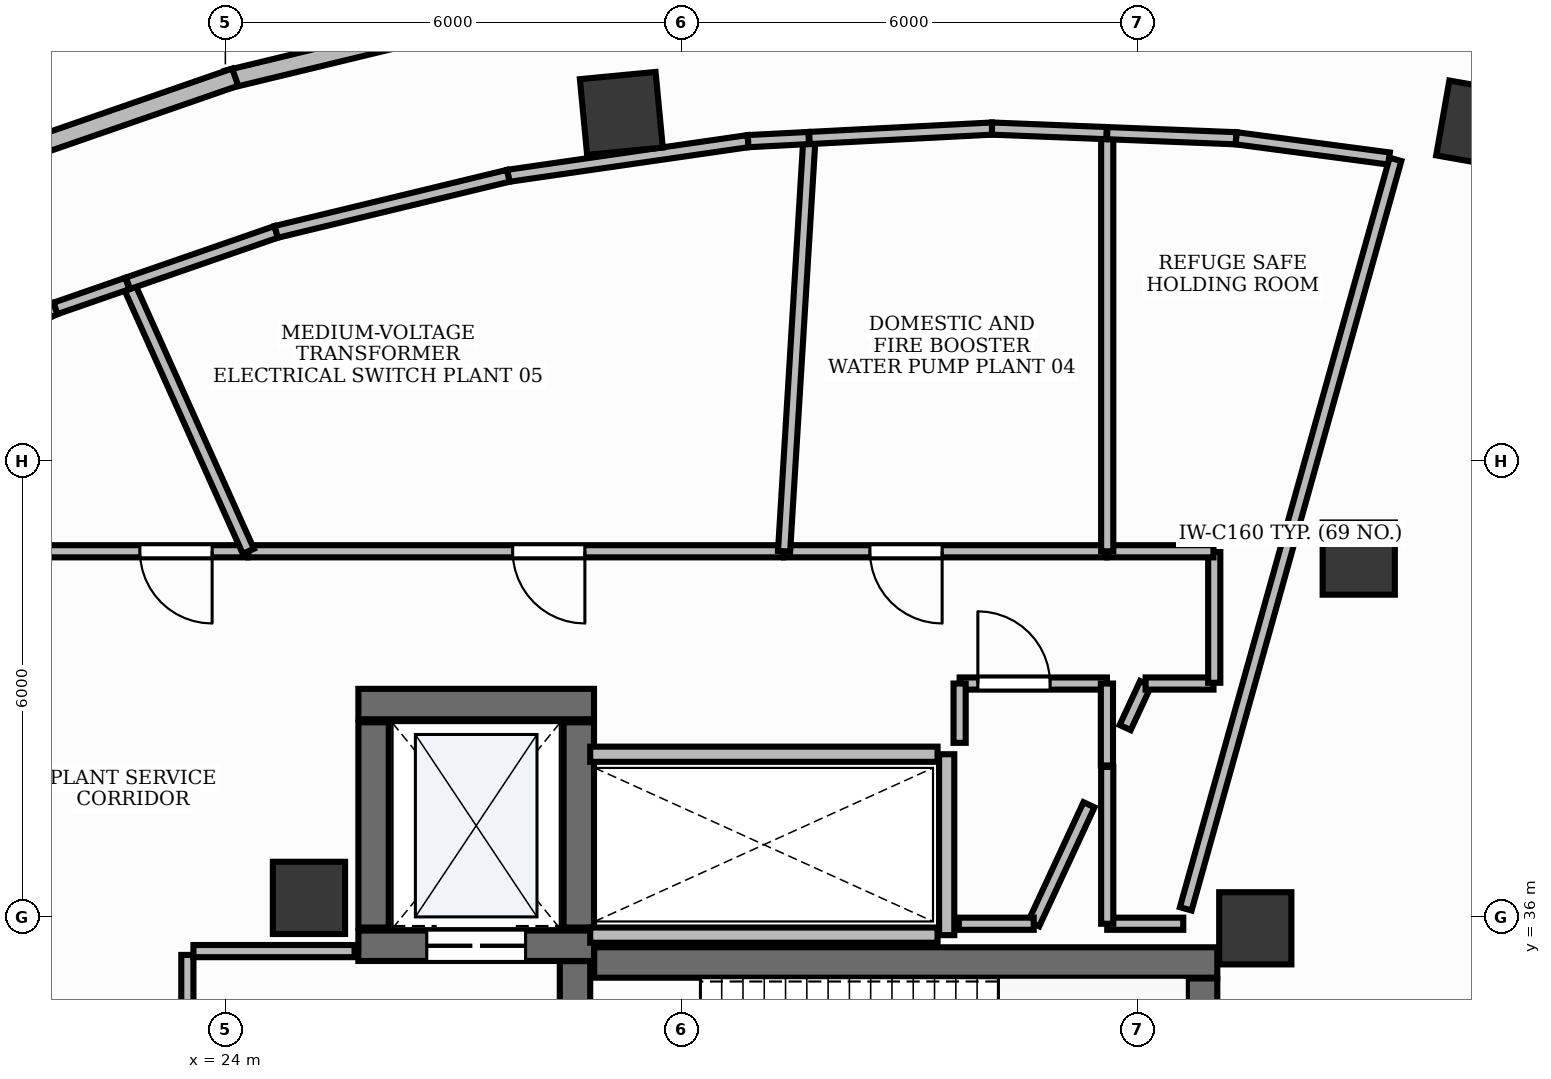
"""IFC4 building model, lengths in metres.
Left out: names, types, materials, properties, quantities, classifications, styles, units other than length and angle.
Written with IfcOpenShell. Run it as: python <this file> out.ifc"""

import sys

from ifc_helpers import new_model, si_unit, direction, frame, frame_2d, origin, origin_2d, place, context, subcontext, project, spatial, rectangle, extrude, element, fill, save


model = new_model("IFC4")
c1 = context("Model", 3, precision=1e-05, world=origin(), true_north=direction((0.0, 1.0)))
c2 = subcontext(c1, "Body", "Model", "MODEL_VIEW")
j1 = project(units=[si_unit("LENGTHUNIT", "METRE"), si_unit("PLANEANGLEUNIT", "RADIAN")], contexts=[c1])
p1 = place(None, origin())
s1 = spatial("IfcSite", under=j1, at=p1, CompositionType="ELEMENT")
p2 = place(p1, origin())
s2 = spatial("IfcBuilding", under=s1, at=p2, CompositionType="ELEMENT")
p3 = place(p2, frame((0.0, 0.0, 213.0)))
s3 = spatial("IfcBuildingStorey", under=s2, at=p3, CompositionType="ELEMENT", Elevation=213.0)
p4 = place(p3, frame((28.852, 35.4, 0.0), z_axis=(0.0, 0.0, 1.0), x_axis=(1.0, 0.0, 0.0)))
e1 = element("IfcWall", 1, at=p4, inside=s3, PredefinedType="SHEAR", context=c2, shape_type="SweptSolid", body=[
    extrude(rectangle(XDim=8.198, YDim=0.4, at=frame_2d((4.099, 0.0))), origin(), (0.0, 0.0, 1.0), 5.1),
])
p5 = place(p3, frame((36.85, 32.11, 0.0), z_axis=(0.0, 0.0, 1.0), x_axis=(0.0, 1.0, 0.0)))
e2 = element("IfcWall", 2, at=p5, inside=s3, PredefinedType="SHEAR", context=c2, shape_type="SweptSolid", body=[
    extrude(rectangle(XDim=3.08, YDim=0.4, at=frame_2d((1.54, 0.0))), origin(), (0.0, 0.0, 1.0), 5.1),
])
p6 = place(p3, frame((28.6, 32.11, 0.0), z_axis=(0.0, 0.0, 1.0), x_axis=(0.0, 1.0, 0.0)))
e3 = element("IfcWall", 3, at=p6, inside=s3, PredefinedType="SHEAR", context=c2, shape_type="SweptSolid", body=[
    extrude(rectangle(XDim=3.308, YDim=0.4, at=frame_2d((1.654, 0.0))), origin(), (0.0, 0.0, 1.0), 5.1),
])
p7 = place(p6, frame((0.2, 0.0, 0.0)))
e4 = element("IfcOpeningElement", 4, at=p7, cuts=e3, PredefinedType="OPENING", context=c2, shape_type="SweptSolid", body=[
    extrude(rectangle(XDim=1.05, YDim=2.15, at=frame_2d((0.525, 1.075))), frame((0.0, 0.215, 0.0), z_axis=(0.0, -1.0, 0.0), x_axis=(1.0, 0.0, 0.0)), (0.0, 0.0, 1.0), 0.43),
])
p8 = place(p3, frame((25.75, 38.8, 0.0), z_axis=(0.0, 0.0, 1.0), x_axis=(1.0, 0.0, 0.0)))
e5 = element("IfcWall", 5, at=p8, inside=s3, PredefinedType="SHEAR", context=c2, shape_type="SweptSolid", body=[
    extrude(rectangle(XDim=3.1, YDim=0.4, at=frame_2d((1.55, 0.0))), origin(), (0.0, 0.0, 1.0), 5.1),
])
p9 = place(p3, frame((25.75, 35.62, 0.0), z_axis=(0.0, 0.0, 1.0), x_axis=(1.0, 0.0, 0.0)))
e6 = element("IfcWall", 6, at=p9, inside=s3, PredefinedType="SHEAR", context=c2, shape_type="SweptSolid", body=[
    extrude(rectangle(XDim=3.1, YDim=0.4, at=frame_2d((1.55, 0.0))), origin(), (0.0, 0.0, 1.0), 5.1),
])
p10 = place(p9, frame((0.9, 0.0, 0.0)))
e7 = element("IfcOpeningElement", 7, at=p10, cuts=e6, PredefinedType="OPENING", context=c2, shape_type="SweptSolid", body=[
    extrude(rectangle(XDim=1.3, YDim=2.2, at=frame_2d((0.65, 1.1))), frame((0.0, 0.215, 0.0), z_axis=(0.0, -1.0, 0.0), x_axis=(1.0, 0.0, 0.0)), (0.0, 0.0, 1.0), 0.43),
])
for number, where, z_axis, x_axis in (
    (8, (25.95, 35.86, 0.0), (0.0, 0.0, 1.0), (0.0, 1.0, 0.0)),
    (9, (28.65, 35.86, 0.0), (0.0, 0.0, 1.0), (0.0, 1.0, 0.0)),
):
    element("IfcWall", number, at=place(p3, frame(where, z_axis=z_axis, x_axis=x_axis)), inside=s3, PredefinedType="SHEAR", context=c2, shape_type="SweptSolid", body=[
        extrude(rectangle(XDim=2.7, YDim=0.4, at=frame_2d((1.35, 0.0))), origin(), (0.0, 0.0, 1.0), 5.1),
    ])
for number, where, z_axis, x_axis in (
    (10, (37.55, 35.85, -0.0), (0.0, 0.0, 1.0), (1.0, 0.0, 0.0)),
    (11, (25.1, 36.25, -0.0), (0.0, 0.0, 1.0), (1.0, 0.0, 0.0)),
):
    element("IfcColumn", number, at=place(p3, frame(where, z_axis=z_axis, x_axis=x_axis)), inside=s3, PredefinedType="PILASTER", context=c2, shape_type="SweptSolid", body=[
        extrude(rectangle(XDim=0.95, YDim=0.95, at=origin_2d()), origin(), (0.0, 0.0, 1.0), 5.101),
    ])
p11 = place(p3, frame((40.509, 46.424, -0.0), z_axis=(0.0, 0.0, 1.0), x_axis=(-0.984868307662, 0.173304404339, 0.0)))
e12 = element("IfcColumn", 12, at=p11, inside=s3, PredefinedType="COLUMN", context=c2, shape_type="SweptSolid", body=[
    extrude(rectangle(XDim=1.0, YDim=1.0, at=origin_2d()), origin(), (0.0, 0.0, 1.0), 5.101),
])
p12 = place(p3, frame((38.911, 40.714, -0.0), z_axis=(0.0, 0.0, 1.0), x_axis=(1.0, 0.0, 0.0)))
e13 = element("IfcColumn", 13, at=p12, inside=s3, PredefinedType="COLUMN", context=c2, shape_type="SweptSolid", body=[
    extrude(rectangle(XDim=0.95, YDim=0.95, at=origin_2d()), origin(), (0.0, 0.0, 1.0), 5.101),
])
p13 = place(p3, frame((29.21, 46.571, -0.0), z_axis=(0.0, 0.0, 1.0), x_axis=(0.995462868748, 0.095150811579, 0.0)))
e14 = element("IfcColumn", 14, at=p13, inside=s3, PredefinedType="COLUMN", context=c2, shape_type="SweptSolid", body=[
    extrude(rectangle(XDim=1.0, YDim=1.0, at=origin_2d()), origin(), (0.0, 0.0, 1.0), 5.101),
])
p14 = place(p3, frame((27.378, 47.827, 0.0), z_axis=(0.0, 0.0, 1.0), x_axis=(-0.972029900204, -0.2348571334, 0.0)))
e15 = element("IfcWall", 15, at=p14, inside=s3, PredefinedType="STANDARD", context=c2, shape_type="SweptSolid", body=[
    extrude(rectangle(XDim=3.452, YDim=0.24, at=frame_2d((1.726, 0.0))), origin(), (0.0, 0.0, 1.0), 5.1),
])
p15 = place(p3, frame((24.129, 47.048, 0.0), z_axis=(0.0, 0.0, 1.0), x_axis=(-0.944829367367, -0.327562920004, 0.0)))
e16 = element("IfcWall", 16, at=p15, inside=s3, PredefinedType="STANDARD", context=c2, shape_type="SweptSolid", body=[
    extrude(rectangle(XDim=3.392, YDim=0.24, at=frame_2d((1.696, 0.0))), origin(), (0.0, 0.0, 1.0), 3.825),
])
p16 = place(p3, frame((33.49, 35.76, 0.0), z_axis=(0.0, 0.0, 1.0), x_axis=(0.0, 1.0, 0.0)))
e17 = element("IfcWall", 17, at=p16, inside=s3, PredefinedType="PARTITIONING", context=c2, shape_type="SweptSolid", body=[
    extrude(rectangle(XDim=2.38, YDim=0.2, at=frame_2d((1.19, 0.0))), origin(), (0.0, 0.0, 1.0), 3.41),
])
for number, where, z_axis, x_axis in (
    (18, (28.8, 35.76, 0.0), (0.0, 0.0, 1.0), (1.0, 0.0, 0.0)),
    (19, (28.8, 38.14, 0.0), (0.0, 0.0, 1.0), (1.0, 0.0, 0.0)),
):
    element("IfcWall", number, at=place(p3, frame(where, z_axis=z_axis, x_axis=x_axis)), inside=s3, PredefinedType="PARTITIONING", context=c2, shape_type="SweptSolid", body=[
        extrude(rectangle(XDim=4.57, YDim=0.2, at=frame_2d((2.285, 0.0))), origin(), (0.0, 0.0, 1.0), 3.41),
    ])
p17 = place(p3, frame((23.5, 32.1, 0.0), z_axis=(0.0, 0.0, 1.0), x_axis=(0.0, 1.0, 0.0)))
e20 = element("IfcWall", 20, at=p17, inside=s3, PredefinedType="PARTITIONING", context=c2, shape_type="SweptSolid", body=[
    extrude(rectangle(XDim=3.4, YDim=0.16, at=frame_2d((1.7, 0.0))), origin(), (0.0, 0.0, 1.0), 3.41),
])
p18 = place(p17, frame((1.175, 0.0, 0.0)))
e21 = element("IfcOpeningElement", 21, at=p18, cuts=e20, PredefinedType="OPENING", context=c2, shape_type="SweptSolid", body=[
    extrude(rectangle(XDim=1.05, YDim=2.15, at=frame_2d((0.525, 1.075))), frame((0.0, 0.095, 0.0), z_axis=(0.0, -1.0, 0.0), x_axis=(1.0, 0.0, 0.0)), (0.0, 0.0, 1.0), 0.19),
])
p19 = place(p3, frame((23.58, 35.55, 0.0), z_axis=(0.0, 0.0, 1.0), x_axis=(1.0, 0.0, 0.0)))
e22 = element("IfcWall", 22, at=p19, inside=s3, PredefinedType="PARTITIONING", context=c2, shape_type="SweptSolid", body=[
    extrude(rectangle(XDim=2.12, YDim=0.16, at=frame_2d((1.06, 0.0))), origin(), (0.0, 0.0, 1.0), 3.41),
])
p20 = place(p3, frame((33.66, 39.07, 0.0), z_axis=(0.0, 0.0, 1.0), x_axis=(1.0, 0.0, 0.0)))
e23 = element("IfcWall", 23, at=p20, inside=s3, PredefinedType="PARTITIONING", context=c2, shape_type="SweptSolid", body=[
    extrude(rectangle(XDim=1.938, YDim=0.16, at=frame_2d((0.969, 0.0))), origin(), (0.0, 0.0, 1.0), 3.41),
])
p21 = place(p20, frame((0.24, 0.0, 0.0)))
e24 = element("IfcOpeningElement", 24, at=p21, cuts=e23, PredefinedType="OPENING", context=c2, shape_type="SweptSolid", body=[
    extrude(rectangle(XDim=0.95, YDim=2.15, at=frame_2d((0.475, 1.075))), frame((0.0, 0.095, 0.0), z_axis=(0.0, -1.0, 0.0), x_axis=(1.0, 0.0, 0.0)), (0.0, 0.0, 1.0), 0.19),
])
p22 = place(p3, frame((35.592, 40.81, 0.0), z_axis=(0.0, 0.0, 1.0), x_axis=(-1.0, 0.0, 0.0)))
e25 = element("IfcWall", 25, at=p22, inside=s3, PredefinedType="PARTITIONING", context=c2, shape_type="SweptSolid", body=[
    extrude(rectangle(XDim=4.242, YDim=0.16, at=frame_2d((2.121, 0.0))), origin(), (0.0, 0.0, 1.0), 3.41),
])
p23 = place(p22, frame((2.162, 0.0, 0.0)))
e26 = element("IfcOpeningElement", 26, at=p23, cuts=e25, PredefinedType="OPENING", context=c2, shape_type="SweptSolid", body=[
    extrude(rectangle(XDim=0.95, YDim=2.15, at=frame_2d((0.475, 1.075))), frame((0.0, 0.095, 0.0), z_axis=(0.0, -1.0, 0.0), x_axis=(1.0, 0.0, 0.0)), (0.0, 0.0, 1.0), 0.19),
])
p24 = place(p3, frame((31.34, 40.81, 0.0), z_axis=(0.0, 0.0, 1.0), x_axis=(-1.0, 0.0, 0.0)))
e27 = element("IfcWall", 27, at=p24, inside=s3, PredefinedType="PARTITIONING", context=c2, shape_type="SweptSolid", body=[
    extrude(rectangle(XDim=7.038, YDim=0.16, at=frame_2d((3.519, 0.0))), origin(), (0.0, 0.0, 1.0), 3.41),
])
p25 = place(p24, frame((2.61, 0.0, 0.0)))
e28 = element("IfcOpeningElement", 28, at=p25, cuts=e27, PredefinedType="OPENING", context=c2, shape_type="SweptSolid", body=[
    extrude(rectangle(XDim=0.95, YDim=2.15, at=frame_2d((0.475, 1.075))), frame((0.0, 0.095, 0.0), z_axis=(0.0, -1.0, 0.0), x_axis=(1.0, 0.0, 0.0)), (0.0, 0.0, 1.0), 0.19),
])
p26 = place(p3, frame((24.292, 40.81, 0.0), z_axis=(0.0, 0.0, 1.0), x_axis=(-1.0, 0.0, 0.0)))
e29 = element("IfcWall", 29, at=p26, inside=s3, PredefinedType="PARTITIONING", context=c2, shape_type="SweptSolid", body=[
    extrude(rectangle(XDim=3.691, YDim=0.16, at=frame_2d((1.846, 0.0))), origin(), (0.0, 0.0, 1.0), 3.41),
])
p27 = place(p26, frame((0.466, 0.0, 0.0)))
e30 = element("IfcOpeningElement", 30, at=p27, cuts=e29, PredefinedType="OPENING", context=c2, shape_type="SweptSolid", body=[
    extrude(rectangle(XDim=0.95, YDim=2.15, at=frame_2d((0.475, 1.075))), frame((0.0, 0.095, 0.0), z_axis=(0.0, -1.0, 0.0), x_axis=(1.0, 0.0, 0.0)), (0.0, 0.0, 1.0), 0.19),
])
p28 = place(p3, frame((33.66, 38.29, 0.0), z_axis=(0.0, 0.0, 1.0), x_axis=(0.0, 1.0, 0.0)))
e31 = element("IfcWall", 31, at=p28, inside=s3, PredefinedType="PARTITIONING", context=c2, shape_type="SweptSolid", body=[
    extrude(rectangle(XDim=0.78, YDim=0.16, at=frame_2d((0.39, 0.0))), origin(), (0.0, 0.0, 1.0), 3.41),
])
p29 = place(p3, frame((35.598, 39.07, 0.0), z_axis=(0.0, 0.0, 1.0), x_axis=(0.0, -1.0, 0.0)))
e32 = element("IfcWall", 32, at=p29, inside=s3, PredefinedType="PARTITIONING", context=c2, shape_type="SweptSolid", body=[
    extrude(rectangle(XDim=1.078, YDim=0.16, at=frame_2d((0.539, 0.0))), origin(), (0.0, 0.0, 1.0), 3.41),
])
p30 = place(p3, frame((35.838, 38.491, 0.0), z_axis=(0.0, 0.0, 1.0), x_axis=(0.421335961971, 0.906904629578, 0.0)))
e33 = element("IfcWall", 33, at=p30, inside=s3, PredefinedType="PARTITIONING", context=c2, shape_type="SweptSolid", body=[
    extrude(rectangle(XDim=0.638, YDim=0.16, at=frame_2d((0.319, 0.0))), origin(), (0.0, 0.0, 1.0), 3.41),
])
p31 = place(p3, frame((36.107, 39.07, 0.0), z_axis=(0.0, 0.0, 1.0), x_axis=(1.0, 0.0, 0.0)))
e34 = element("IfcWall", 34, at=p31, inside=s3, PredefinedType="PARTITIONING", context=c2, shape_type="SweptSolid", body=[
    extrude(rectangle(XDim=0.893, YDim=0.16, at=frame_2d((0.447, 0.0))), origin(), (0.0, 0.0, 1.0), 3.41),
])
p32 = place(p3, frame((37.01, 39.08, 0.0), z_axis=(0.0, 0.0, 1.0), x_axis=(0.0, 1.0, 0.0)))
e35 = element("IfcWall", 35, at=p32, inside=s3, PredefinedType="PARTITIONING", context=c2, shape_type="SweptSolid", body=[
    extrude(rectangle(XDim=1.72, YDim=0.16, at=frame_2d((0.86, 0.0))), origin(), (0.0, 0.0, 1.0), 3.41),
])
p33 = place(p3, frame((37.0, 40.81, 0.0), z_axis=(0.0, 0.0, 1.0), x_axis=(-1.0, 0.0, 0.0)))
e36 = element("IfcWall", 36, at=p33, inside=s3, PredefinedType="PARTITIONING", context=c2, shape_type="SweptSolid", body=[
    extrude(rectangle(XDim=1.398, YDim=0.16, at=frame_2d((0.699, 0.0))), origin(), (0.0, 0.0, 1.0), 3.41),
])
p34 = place(p3, frame((35.602, 40.81, 0.0), z_axis=(0.0, 0.0, 1.0), x_axis=(0.0, 1.0, 0.0)))
e37 = element("IfcWall", 37, at=p34, inside=s3, PredefinedType="PARTITIONING", context=c2, shape_type="SweptSolid", body=[
    extrude(rectangle(XDim=5.501, YDim=0.16, at=frame_2d((2.75, 0.0))), origin(), (0.0, 0.0, 1.0), 3.41),
])
p35 = place(p3, frame((35.602, 46.311, 0.0), z_axis=(0.0, 0.0, 1.0), x_axis=(0.999211947878, -0.03969235717, 0.0)))
e38 = element("IfcWall", 38, at=p35, inside=s3, PredefinedType="PARTITIONING", context=c2, shape_type="SweptSolid", body=[
    extrude(rectangle(XDim=1.698, YDim=0.16, at=frame_2d((0.849, 0.0))), origin(), (0.0, 0.0, 1.0), 3.41),
])
p36 = place(p3, frame((37.299, 46.243, 0.0), z_axis=(0.0, 0.0, 1.0), x_axis=(0.991359829501, -0.131170455712, 0.0)))
e39 = element("IfcWall", 39, at=p36, inside=s3, PredefinedType="PARTITIONING", context=c2, shape_type="SweptSolid", body=[
    extrude(rectangle(XDim=2.029, YDim=0.16, at=frame_2d((1.014, 0.0))), origin(), (0.0, 0.0, 1.0), 3.41),
])
p37 = place(p3, frame((39.394, 45.966, 0.0), z_axis=(0.0, 0.0, 1.0), x_axis=(-0.269473372213, -0.963007840917, 0.0)))
e40 = element("IfcWall", 40, at=p37, inside=s3, PredefinedType="PARTITIONING", context=c2, shape_type="SweptSolid", body=[
    extrude(rectangle(XDim=10.239, YDim=0.16, at=frame_2d((5.119, 0.0))), origin(), (0.0, 0.0, 1.0), 3.41),
])
p38 = place(p3, frame((36.602, 35.91, 0.0), z_axis=(0.0, 0.0, 1.0), x_axis=(-1.0, 0.0, 0.0)))
e41 = element("IfcWall", 41, at=p38, inside=s3, PredefinedType="PARTITIONING", context=c2, shape_type="SweptSolid", body=[
    extrude(rectangle(XDim=1.0, YDim=0.16, at=frame_2d((0.5, 0.0))), origin(), (0.0, 0.0, 1.0), 3.41),
])
p39 = place(p3, frame((35.602, 35.91, 0.0), z_axis=(0.0, 0.0, 1.0), x_axis=(0.0, 1.0, 0.0)))
e42 = element("IfcWall", 42, at=p39, inside=s3, PredefinedType="PARTITIONING", context=c2, shape_type="SweptSolid", body=[
    extrude(rectangle(XDim=2.064, YDim=0.16, at=frame_2d((1.032, 0.0))), origin(), (0.0, 0.0, 1.0), 3.41),
])
p40 = place(p3, frame((35.362, 37.475, 0.0), z_axis=(0.0, 0.0, 1.0), x_axis=(-0.421227666109, -0.90695493455, 0.0)))
e43 = element("IfcWall", 43, at=p40, inside=s3, PredefinedType="PARTITIONING", context=c2, shape_type="SweptSolid", body=[
    extrude(rectangle(XDim=1.726, YDim=0.16, at=frame_2d((0.863, 0.0))), origin(), (0.0, 0.0, 1.0), 3.41),
])
p41 = place(p3, frame((34.635, 35.91, 0.0), z_axis=(0.0, 0.0, 1.0), x_axis=(-1.0, 0.0, 0.0)))
e44 = element("IfcWall", 44, at=p41, inside=s3, PredefinedType="PARTITIONING", context=c2, shape_type="SweptSolid", body=[
    extrude(rectangle(XDim=0.985, YDim=0.16, at=frame_2d((0.493, 0.0))), origin(), (0.0, 0.0, 1.0), 3.41),
])
p42 = place(p3, frame((31.35, 40.81, 0.0), z_axis=(0.0, 0.0, 1.0), x_axis=(0.061309618462, 0.998118795878, 0.0)))
e45 = element("IfcWall", 45, at=p42, inside=s3, PredefinedType="PARTITIONING", context=c2, shape_type="SweptSolid", body=[
    extrude(rectangle(XDim=5.448, YDim=0.16, at=frame_2d((2.724, 0.0))), origin(), (0.0, 0.0, 1.0), 3.41),
])
p43 = place(p3, frame((31.684, 46.247, 0.0), z_axis=(0.0, 0.0, 1.0), x_axis=(0.998674718076, 0.051466566585, 0.0)))
e46 = element("IfcWall", 46, at=p43, inside=s3, PredefinedType="PARTITIONING", context=c2, shape_type="SweptSolid", body=[
    extrude(rectangle(XDim=2.405, YDim=0.16, at=frame_2d((1.203, 0.0))), origin(), (0.0, 0.0, 1.0), 3.41),
])
p44 = place(p3, frame((34.086, 46.371, 0.0), z_axis=(0.0, 0.0, 1.0), x_axis=(0.999212047746, -0.039689843012, 0.0)))
e47 = element("IfcWall", 47, at=p44, inside=s3, PredefinedType="PARTITIONING", context=c2, shape_type="SweptSolid", body=[
    extrude(rectangle(XDim=1.507, YDim=0.16, at=frame_2d((0.753, 0.0))), origin(), (0.0, 0.0, 1.0), 3.41),
])
p45 = place(p3, frame((27.722, 45.75, 0.0), z_axis=(0.0, 0.0, 1.0), x_axis=(0.989727754906, 0.142964929858, 0.0)))
e48 = element("IfcWall", 48, at=p45, inside=s3, PredefinedType="PARTITIONING", context=c2, shape_type="SweptSolid", body=[
    extrude(rectangle(XDim=3.188, YDim=0.16, at=frame_2d((1.594, 0.0))), origin(), (0.0, 0.0, 1.0), 3.41),
])
p46 = place(p3, frame((30.877, 46.206, 0.0), z_axis=(0.0, 0.0, 1.0), x_axis=(0.998678015367, 0.051402544909, 0.0)))
e49 = element("IfcWall", 49, at=p46, inside=s3, PredefinedType="PARTITIONING", context=c2, shape_type="SweptSolid", body=[
    extrude(rectangle(XDim=0.798, YDim=0.16, at=frame_2d((0.399, 0.0))), origin(), (0.0, 0.0, 1.0), 3.41),
])
p47 = place(p3, frame((24.302, 40.81, 0.0), z_axis=(0.0, 0.0, 1.0), x_axis=(-0.409558218272, 0.912283983114, 0.0)))
e50 = element("IfcWall", 50, at=p47, inside=s3, PredefinedType="PARTITIONING", context=c2, shape_type="SweptSolid", body=[
    extrude(rectangle(XDim=3.865, YDim=0.16, at=frame_2d((1.933, 0.0))), origin(), (0.0, 0.0, 1.0), 3.41),
])
p48 = place(p3, frame((22.719, 44.336, 0.0), z_axis=(0.0, 0.0, 1.0), x_axis=(0.944828385258, 0.327565752805, 0.0)))
e51 = element("IfcWall", 51, at=p48, inside=s3, PredefinedType="PARTITIONING", context=c2, shape_type="SweptSolid", body=[
    extrude(rectangle(XDim=2.063, YDim=0.16, at=frame_2d((1.031, 0.0))), origin(), (0.0, 0.0, 1.0), 3.41),
])
p49 = place(p3, frame((24.669, 45.012, 0.0), z_axis=(0.0, 0.0, 1.0), x_axis=(0.97202349175, 0.234883655211, 0.0)))
e52 = element("IfcWall", 52, at=p49, inside=s3, PredefinedType="PARTITIONING", context=c2, shape_type="SweptSolid", body=[
    extrude(rectangle(XDim=3.141, YDim=0.16, at=frame_2d((1.571, 0.0))), origin(), (0.0, 0.0, 1.0), 3.41),
])
p50 = place(p3, frame((19.902, 43.141, 0.0), z_axis=(0.0, 0.0, 1.0), x_axis=(0.907143514613, 0.420821391918, 0.0)))
e53 = element("IfcWall", 53, at=p50, inside=s3, PredefinedType="PARTITIONING", context=c2, shape_type="SweptSolid", body=[
    extrude(rectangle(XDim=2.054, YDim=0.16, at=frame_2d((1.027, 0.0))), origin(), (0.0, 0.0, 1.0), 3.41),
])
p51 = place(p3, frame((21.765, 44.006, 0.0), z_axis=(0.0, 0.0, 1.0), x_axis=(0.944855343149, 0.32748798531, 0.0)))
e54 = element("IfcWall", 54, at=p51, inside=s3, PredefinedType="PARTITIONING", context=c2, shape_type="SweptSolid", body=[
    extrude(rectangle(XDim=1.0, YDim=0.16, at=frame_2d((0.5, 0.0))), origin(), (0.0, 0.0, 1.0), 3.41),
])
p52 = place(p10, origin())
e55 = element("IfcDoor", 55, at=p52, inside=s3, OperationType="DOUBLE_DOOR_SLIDING", PredefinedType="DOOR", context=c2, shape_type="SweptSolid", body=[
    extrude(rectangle(XDim=1.3, YDim=2.2, at=frame_2d((0.65, 1.1))), frame((0.0, 0.025, 0.0), z_axis=(0.0, -1.0, 0.0), x_axis=(1.0, 0.0, 0.0)), (0.0, 0.0, 1.0), 0.05),
])
fill(e7, e55)
p53 = place(p21, origin())
e56 = element("IfcDoor", 56, at=p53, inside=s3, OperationType="SINGLE_SWING_LEFT", PredefinedType="DOOR", context=c2, shape_type="SweptSolid", body=[
    extrude(rectangle(XDim=0.95, YDim=2.15, at=frame_2d((0.475, 1.075))), frame((0.0, 0.025, 0.0), z_axis=(0.0, -1.0, 0.0), x_axis=(1.0, 0.0, 0.0)), (0.0, 0.0, 1.0), 0.05),
])
fill(e24, e56)
p54 = place(p23, origin())
e57 = element("IfcDoor", 57, at=p54, inside=s3, OperationType="SINGLE_SWING_LEFT", PredefinedType="DOOR", context=c2, shape_type="SweptSolid", body=[
    extrude(rectangle(XDim=0.95, YDim=2.15, at=frame_2d((0.475, 1.075))), frame((0.0, 0.025, 0.0), z_axis=(0.0, -1.0, 0.0), x_axis=(1.0, 0.0, 0.0)), (0.0, 0.0, 1.0), 0.05),
])
fill(e26, e57)
p55 = place(p25, origin())
e58 = element("IfcDoor", 58, at=p55, inside=s3, OperationType="SINGLE_SWING_LEFT", PredefinedType="DOOR", context=c2, shape_type="SweptSolid", body=[
    extrude(rectangle(XDim=0.95, YDim=2.15, at=frame_2d((0.475, 1.075))), frame((0.0, 0.025, 0.0), z_axis=(0.0, -1.0, 0.0), x_axis=(1.0, 0.0, 0.0)), (0.0, 0.0, 1.0), 0.05),
])
fill(e28, e58)
p56 = place(p27, origin())
e59 = element("IfcDoor", 59, at=p56, inside=s3, OperationType="SINGLE_SWING_LEFT", PredefinedType="DOOR", context=c2, shape_type="SweptSolid", body=[
    extrude(rectangle(XDim=0.95, YDim=2.15, at=frame_2d((0.475, 1.075))), frame((0.0, 0.025, 0.0), z_axis=(0.0, -1.0, 0.0), x_axis=(1.0, 0.0, 0.0)), (0.0, 0.0, 1.0), 0.05),
])
fill(e30, e59)
save(model, sys.argv[1])
